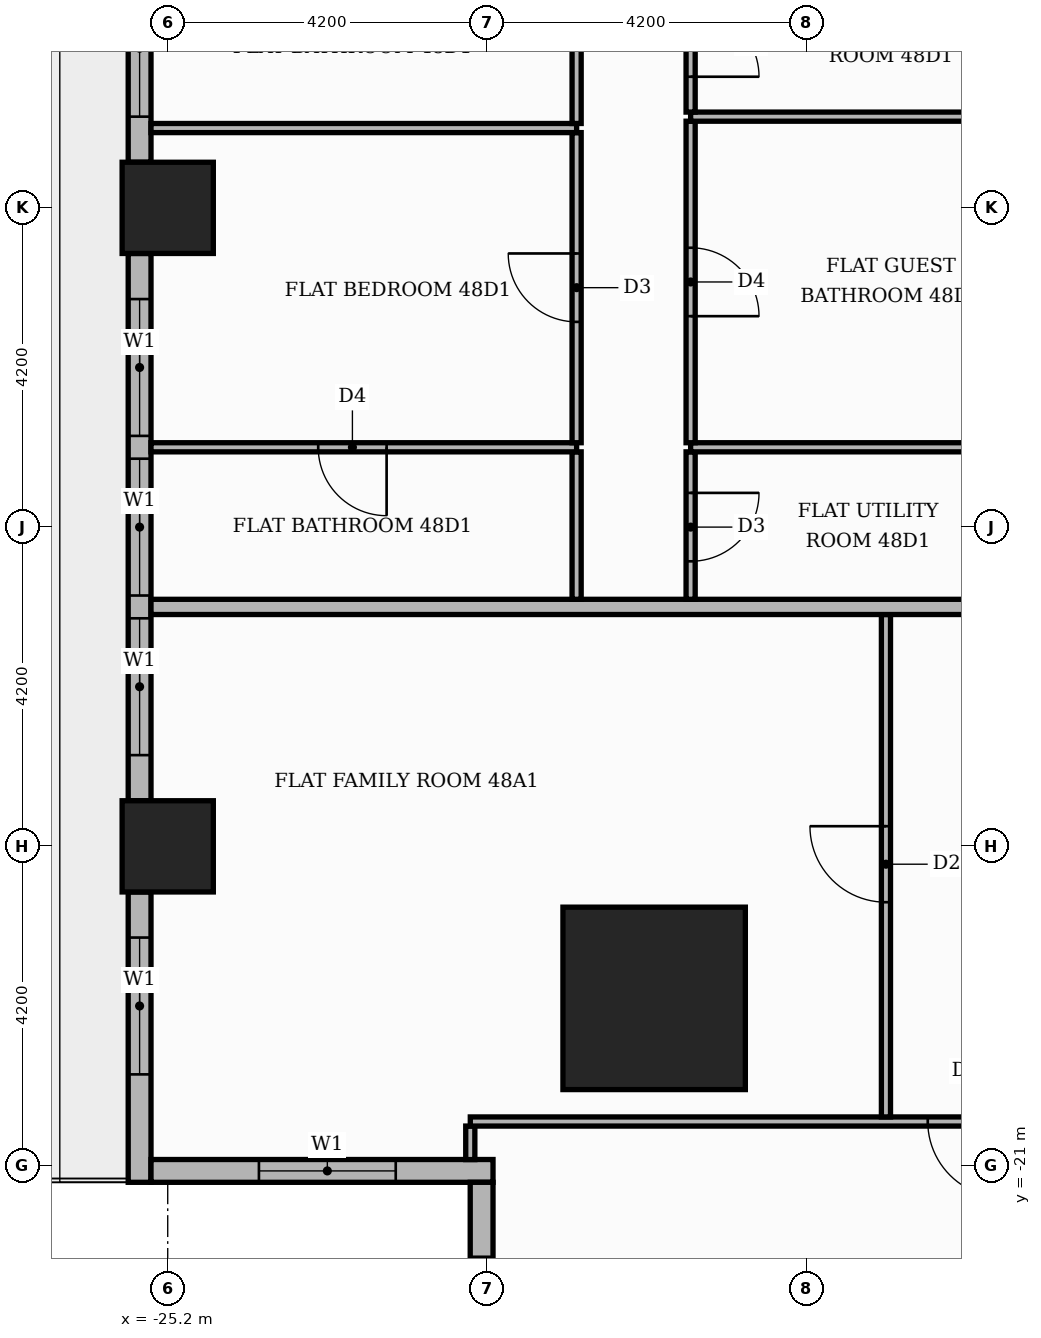
"""IFC4 building model, lengths in metres.
Left out: names, types, materials, properties, quantities, classifications, styles, units other than length and angle.
Written with IfcOpenShell. Run it as: python <this file> out.ifc"""

import sys

from ifc_helpers import new_model, si_unit, direction, frame, frame_2d, origin, origin_2d, place, context, subcontext, project, spatial, rectangle, extrude, element, fill, save


model = new_model("IFC4")
c1 = context("Model", 3, precision=1e-05, world=origin(), true_north=direction((0.0, 1.0)))
c2 = subcontext(c1, "Body", "Model", "MODEL_VIEW")
j1 = project(units=[si_unit("LENGTHUNIT", "METRE"), si_unit("PLANEANGLEUNIT", "RADIAN")], contexts=[c1])
p1 = place(None, origin())
s1 = spatial("IfcSite", under=j1, at=p1, CompositionType="ELEMENT")
p2 = place(p1, origin())
s2 = spatial("IfcBuilding", under=s1, at=p2, CompositionType="ELEMENT")
p3 = place(p2, frame((0.0, 0.0, 204.0)))
s3 = spatial("IfcBuildingStorey", under=s2, at=p3, CompositionType="ELEMENT", Elevation=204.0)
p4 = place(p3, frame((-18.8, -18.8, 0.0), z_axis=(0.0, 0.0, 1.0), x_axis=(1.0, 0.0, 0.0)))
e1 = element("IfcColumn", 1, at=p4, inside=s3, PredefinedType="COLUMN", context=c2, shape_type="SweptSolid", body=[
    extrude(rectangle(XDim=2.4, YDim=2.4, at=origin_2d()), origin(), (0.0, 0.0, 1.0), 3.9),
])
for number, where, z_axis, x_axis in (
    (2, (-25.2, -8.4, 0.0), (0.0, 0.0, 1.0), (1.0, 0.0, 0.0)),
    (3, (-25.2, -16.8, 0.0), (0.0, 0.0, 1.0), (1.0, 0.0, 0.0)),
):
    element("IfcColumn", number, at=place(p3, frame(where, z_axis=z_axis, x_axis=x_axis)), inside=s3, PredefinedType="COLUMN", context=c2, shape_type="SweptSolid", body=[
        extrude(rectangle(XDim=1.2, YDim=1.2, at=origin_2d()), origin(), (0.0, 0.0, 1.0), 3.9),
    ])
p5 = place(p3, frame((-25.57, -0.6, 0.0), z_axis=(0.0, 0.0, 1.0), x_axis=(0.0, -1.0, 0.0)))
e4 = element("IfcWall", 4, at=p5, inside=s3, PredefinedType="STANDARD", context=c2, shape_type="SweptSolid", body=[
    extrude(rectangle(XDim=7.2, YDim=0.3, at=frame_2d((3.6, 0.0))), origin(), (0.0, 0.0, 1.0), 3.48),
])
p6 = place(p5, frame((0.6, 0.0, 0.9)))
e5 = element("IfcOpeningElement", 5, at=p6, cuts=e4, PredefinedType="OPENING", context=c2, shape_type="SweptSolid", body=[
    extrude(rectangle(XDim=3.9, YDim=2.1, at=frame_2d((1.95, 1.05))), frame((0.0, 0.16, 0.0), z_axis=(0.0, -1.0, 0.0), x_axis=(1.0, 0.0, 0.0)), (0.0, 0.0, 1.0), 0.32),
])
p7 = place(p5, frame((4.8, 0.0, 0.9)))
e6 = element("IfcOpeningElement", 6, at=p7, cuts=e4, PredefinedType="OPENING", context=c2, shape_type="SweptSolid", body=[
    extrude(rectangle(XDim=1.8, YDim=2.1, at=frame_2d((0.9, 1.05))), frame((0.0, 0.16, 0.0), z_axis=(0.0, -1.0, 0.0), x_axis=(1.0, 0.0, 0.0)), (0.0, 0.0, 1.0), 0.32),
])
p8 = place(p3, frame((-25.57, -9.0, 0.0), z_axis=(0.0, 0.0, 1.0), x_axis=(0.0, -1.0, 0.0)))
e7 = element("IfcWall", 7, at=p8, inside=s3, PredefinedType="STANDARD", context=c2, shape_type="SweptSolid", body=[
    extrude(rectangle(XDim=7.2, YDim=0.3, at=frame_2d((3.6, 0.0))), origin(), (0.0, 0.0, 1.0), 3.48),
])
p9 = place(p8, frame((0.6, 0.0, 0.9)))
e8 = element("IfcOpeningElement", 8, at=p9, cuts=e7, PredefinedType="OPENING", context=c2, shape_type="SweptSolid", body=[
    extrude(rectangle(XDim=1.8, YDim=2.1, at=frame_2d((0.9, 1.05))), frame((0.0, 0.16, 0.0), z_axis=(0.0, -1.0, 0.0), x_axis=(1.0, 0.0, 0.0)), (0.0, 0.0, 1.0), 0.32),
])
p10 = place(p8, frame((2.7, 0.0, 0.9)))
e9 = element("IfcOpeningElement", 9, at=p10, cuts=e7, PredefinedType="OPENING", context=c2, shape_type="SweptSolid", body=[
    extrude(rectangle(XDim=1.8, YDim=2.1, at=frame_2d((0.9, 1.05))), frame((0.0, 0.16, 0.0), z_axis=(0.0, -1.0, 0.0), x_axis=(1.0, 0.0, 0.0)), (0.0, 0.0, 1.0), 0.32),
])
p11 = place(p8, frame((4.8, 0.0, 0.9)))
e10 = element("IfcOpeningElement", 10, at=p11, cuts=e7, PredefinedType="OPENING", context=c2, shape_type="SweptSolid", body=[
    extrude(rectangle(XDim=1.8, YDim=2.1, at=frame_2d((0.9, 1.05))), frame((0.0, 0.16, 0.0), z_axis=(0.0, -1.0, 0.0), x_axis=(1.0, 0.0, 0.0)), (0.0, 0.0, 1.0), 0.32),
])
p12 = place(p3, frame((-25.57, -17.4, 0.0), z_axis=(0.0, 0.0, 1.0), x_axis=(0.0, -1.0, 0.0)))
e11 = element("IfcWall", 11, at=p12, inside=s3, PredefinedType="STANDARD", context=c2, shape_type="SweptSolid", body=[
    extrude(rectangle(XDim=3.82, YDim=0.3, at=frame_2d((1.91, 0.0))), origin(), (0.0, 0.0, 1.0), 3.48),
])
p13 = place(p12, frame((0.6, 0.0, 0.9)))
e12 = element("IfcOpeningElement", 12, at=p13, cuts=e11, PredefinedType="OPENING", context=c2, shape_type="SweptSolid", body=[
    extrude(rectangle(XDim=1.8, YDim=2.1, at=frame_2d((0.9, 1.05))), frame((0.0, 0.16, 0.0), z_axis=(0.0, -1.0, 0.0), x_axis=(1.0, 0.0, 0.0)), (0.0, 0.0, 1.0), 0.32),
])
p14 = place(p3, frame((-25.42, -21.07, 0.0), z_axis=(0.0, 0.0, 1.0), x_axis=(1.0, 0.0, 0.0)))
e13 = element("IfcWall", 13, at=p14, inside=s3, PredefinedType="STANDARD", context=c2, shape_type="SweptSolid", body=[
    extrude(rectangle(XDim=4.5, YDim=0.3, at=frame_2d((2.25, 0.0))), origin(), (0.0, 0.0, 1.0), 3.48),
])
p15 = place(p14, frame((1.42, 0.0, 0.9)))
e14 = element("IfcOpeningElement", 14, at=p15, cuts=e13, PredefinedType="OPENING", context=c2, shape_type="SweptSolid", body=[
    extrude(rectangle(XDim=1.8, YDim=2.1, at=frame_2d((0.9, 1.05))), frame((0.0, 0.16, 0.0), z_axis=(0.0, -1.0, 0.0), x_axis=(1.0, 0.0, 0.0)), (0.0, 0.0, 1.0), 0.32),
])
p16 = place(p3, frame((-21.07, -21.22, 0.0), z_axis=(0.0, 0.0, 1.0), x_axis=(0.0, -1.0, 0.0)))
e15 = element("IfcWall", 15, at=p16, inside=s3, PredefinedType="STANDARD", context=c2, shape_type="SweptSolid", body=[
    extrude(rectangle(XDim=4.5, YDim=0.3, at=frame_2d((2.25, 0.0))), origin(), (0.0, 0.0, 1.0), 3.48),
])
p17 = place(p16, frame((0.98, 0.0, 0.9)))
e16 = element("IfcOpeningElement", 16, at=p17, cuts=e15, PredefinedType="OPENING", context=c2, shape_type="SweptSolid", body=[
    extrude(rectangle(XDim=1.8, YDim=2.1, at=frame_2d((0.9, 1.05))), frame((0.0, 0.16, 0.0), z_axis=(0.0, -1.0, 0.0), x_axis=(1.0, 0.0, 0.0)), (0.0, 0.0, 1.0), 0.32),
])
p18 = place(p3, frame((-21.219, -20.921, 0.0), z_axis=(0.0, 0.0, 1.0), x_axis=(0.0, 1.0, 0.0)))
e17 = element("IfcWall", 17, at=p18, inside=s3, PredefinedType="PARTITIONING", context=c2, shape_type="SweptSolid", body=[
    extrude(rectangle(XDim=0.441, YDim=0.12, at=frame_2d((0.22, 0.0))), origin(), (0.0, 0.0, 1.0), 3.48),
])
p19 = place(p3, frame((-21.219, -20.42, 0.0), z_axis=(0.0, 0.0, 1.0), x_axis=(1.0, 0.0, 0.0)))
e18 = element("IfcWall", 18, at=p19, inside=s3, PredefinedType="PARTITIONING", context=c2, shape_type="SweptSolid", body=[
    extrude(rectangle(XDim=15.869, YDim=0.12, at=frame_2d((7.935, 0.0))), origin(), (0.0, 0.0, 1.0), 3.48),
])
p20 = place(p19, frame((6.019, 0.0, 0.0)))
e19 = element("IfcOpeningElement", 19, at=p20, cuts=e18, PredefinedType="OPENING", context=c2, shape_type="SweptSolid", body=[
    extrude(rectangle(XDim=1.0, YDim=2.1, at=frame_2d((0.5, 1.05))), frame((0.0, 0.07, 0.0), z_axis=(0.0, -1.0, 0.0), x_axis=(1.0, 0.0, 0.0)), (0.0, 0.0, 1.0), 0.14),
])
p21 = place(p19, frame((9.219, 0.0, 0.0)))
e20 = element("IfcOpeningElement", 20, at=p21, cuts=e18, PredefinedType="OPENING", context=c2, shape_type="SweptSolid", body=[
    extrude(rectangle(XDim=0.9, YDim=2.1, at=frame_2d((0.45, 1.05))), frame((0.0, 0.07, 0.0), z_axis=(0.0, -1.0, 0.0), x_axis=(1.0, 0.0, 0.0)), (0.0, 0.0, 1.0), 0.14),
])
p22 = place(p3, frame((-15.75, -20.36, 0.0), z_axis=(0.0, 0.0, 1.0), x_axis=(0.0, 1.0, 0.0)))
e21 = element("IfcWall", 21, at=p22, inside=s3, PredefinedType="PARTITIONING", context=c2, shape_type="SweptSolid", body=[
    extrude(rectangle(XDim=6.61, YDim=0.12, at=frame_2d((3.305, 0.0))), origin(), (0.0, 0.0, 1.0), 3.48),
])
p23 = place(p22, frame((2.825, 0.0, 0.0)))
e22 = element("IfcOpeningElement", 22, at=p23, cuts=e21, PredefinedType="OPENING", context=c2, shape_type="SweptSolid", body=[
    extrude(rectangle(XDim=1.0, YDim=2.1, at=frame_2d((0.5, 1.05))), frame((0.0, 0.07, 0.0), z_axis=(0.0, -1.0, 0.0), x_axis=(1.0, 0.0, 0.0)), (0.0, 0.0, 1.0), 0.14),
])
p24 = place(p3, frame((-25.42, -13.65, 0.0), z_axis=(0.0, 0.0, 1.0), x_axis=(1.0, 0.0, 0.0)))
e23 = element("IfcWall", 23, at=p24, inside=s3, PredefinedType="PARTITIONING", context=c2, shape_type="SweptSolid", body=[
    extrude(rectangle(XDim=39.07, YDim=0.2, at=frame_2d((19.535, 0.0))), origin(), (0.0, 0.0, 1.0), 3.48),
])
p25 = place(p24, frame((13.32, 0.0, 0.0)))
e24 = element("IfcOpeningElement", 24, at=p25, cuts=e23, PredefinedType="OPENING", context=c2, shape_type="SweptSolid", body=[
    extrude(rectangle(XDim=1.1, YDim=2.4, at=frame_2d((0.55, 1.2))), frame((0.0, 0.11, 0.0), z_axis=(0.0, -1.0, 0.0), x_axis=(1.0, 0.0, 0.0)), (0.0, 0.0, 1.0), 0.22),
])
p26 = place(p24, frame((25.92, 0.0, 0.0)))
e25 = element("IfcOpeningElement", 25, at=p26, cuts=e23, PredefinedType="OPENING", context=c2, shape_type="SweptSolid", body=[
    extrude(rectangle(XDim=1.1, YDim=2.4, at=frame_2d((0.55, 1.2))), frame((0.0, 0.11, 0.0), z_axis=(0.0, -1.0, 0.0), x_axis=(1.0, 0.0, 0.0)), (0.0, 0.0, 1.0), 0.22),
])
p27 = place(p3, frame((-19.82, -13.55, 0.0), z_axis=(0.0, 0.0, 1.0), x_axis=(0.0, 1.0, 0.0)))
e26 = element("IfcWall", 26, at=p27, inside=s3, PredefinedType="PARTITIONING", context=c2, shape_type="SweptSolid", body=[
    extrude(rectangle(XDim=1.94, YDim=0.12, at=frame_2d((0.97, 0.0))), origin(), (0.0, 0.0, 1.0), 3.48),
])
p28 = place(p3, frame((-18.32, -13.55, 0.0), z_axis=(0.0, 0.0, 1.0), x_axis=(0.0, 1.0, 0.0)))
e27 = element("IfcWall", 27, at=p28, inside=s3, PredefinedType="PARTITIONING", context=c2, shape_type="SweptSolid", body=[
    extrude(rectangle(XDim=1.94, YDim=0.12, at=frame_2d((0.97, 0.0))), origin(), (0.0, 0.0, 1.0), 3.48),
])
p29 = place(p28, frame((0.5, 0.0, 0.0)))
e28 = element("IfcOpeningElement", 28, at=p29, cuts=e27, PredefinedType="OPENING", context=c2, shape_type="SweptSolid", body=[
    extrude(rectangle(XDim=0.9, YDim=2.1, at=frame_2d((0.45, 1.05))), frame((0.0, 0.07, 0.0), z_axis=(0.0, -1.0, 0.0), x_axis=(1.0, 0.0, 0.0)), (0.0, 0.0, 1.0), 0.14),
])
p30 = place(p3, frame((-25.42, -11.55, 0.0), z_axis=(0.0, 0.0, 1.0), x_axis=(1.0, 0.0, 0.0)))
e29 = element("IfcWall", 29, at=p30, inside=s3, PredefinedType="PARTITIONING", context=c2, shape_type="SweptSolid", body=[
    extrude(rectangle(XDim=5.6, YDim=0.12, at=frame_2d((2.8, 0.0))), origin(), (0.0, 0.0, 1.0), 3.48),
])
p31 = place(p30, frame((2.2, 0.0, 0.0)))
e30 = element("IfcOpeningElement", 30, at=p31, cuts=e29, PredefinedType="OPENING", context=c2, shape_type="SweptSolid", body=[
    extrude(rectangle(XDim=0.9, YDim=2.1, at=frame_2d((0.45, 1.05))), frame((0.0, 0.07, 0.0), z_axis=(0.0, -1.0, 0.0), x_axis=(1.0, 0.0, 0.0)), (0.0, 0.0, 1.0), 0.14),
])
p32 = place(p3, frame((-18.32, -11.55, 0.0), z_axis=(0.0, 0.0, 1.0), x_axis=(1.0, 0.0, 0.0)))
e31 = element("IfcWall", 31, at=p32, inside=s3, PredefinedType="PARTITIONING", context=c2, shape_type="SweptSolid", body=[
    extrude(rectangle(XDim=4.57, YDim=0.12, at=frame_2d((2.285, 0.0))), origin(), (0.0, 0.0, 1.0), 3.48),
])
p33 = place(p3, frame((-19.82, -11.49, 0.0), z_axis=(0.0, 0.0, 1.0), x_axis=(0.0, 1.0, 0.0)))
e32 = element("IfcWall", 32, at=p33, inside=s3, PredefinedType="PARTITIONING", context=c2, shape_type="SweptSolid", body=[
    extrude(rectangle(XDim=4.08, YDim=0.12, at=frame_2d((2.04, 0.0))), origin(), (0.0, 0.0, 1.0), 3.48),
])
p34 = place(p33, frame((1.59, 0.0, 0.0)))
e33 = element("IfcOpeningElement", 33, at=p34, cuts=e32, PredefinedType="OPENING", context=c2, shape_type="SweptSolid", body=[
    extrude(rectangle(XDim=0.9, YDim=2.1, at=frame_2d((0.45, 1.05))), frame((0.0, 0.07, 0.0), z_axis=(0.0, -1.0, 0.0), x_axis=(1.0, 0.0, 0.0)), (0.0, 0.0, 1.0), 0.14),
])
p35 = place(p3, frame((-18.32, -11.49, 0.0), z_axis=(0.0, 0.0, 1.0), x_axis=(0.0, 1.0, 0.0)))
e34 = element("IfcWall", 34, at=p35, inside=s3, PredefinedType="PARTITIONING", context=c2, shape_type="SweptSolid", body=[
    extrude(rectangle(XDim=4.23, YDim=0.12, at=frame_2d((2.115, 0.0))), origin(), (0.0, 0.0, 1.0), 3.48),
])
p36 = place(p35, frame((1.665, 0.0, 0.0)))
e35 = element("IfcOpeningElement", 35, at=p36, cuts=e34, PredefinedType="OPENING", context=c2, shape_type="SweptSolid", body=[
    extrude(rectangle(XDim=0.9, YDim=2.1, at=frame_2d((0.45, 1.05))), frame((0.0, 0.07, 0.0), z_axis=(0.0, -1.0, 0.0), x_axis=(1.0, 0.0, 0.0)), (0.0, 0.0, 1.0), 0.14),
])
p37 = place(p3, frame((-25.42, -7.35, 0.0), z_axis=(0.0, 0.0, 1.0), x_axis=(1.0, 0.0, 0.0)))
e36 = element("IfcWall", 36, at=p37, inside=s3, PredefinedType="PARTITIONING", context=c2, shape_type="SweptSolid", body=[
    extrude(rectangle(XDim=5.6, YDim=0.12, at=frame_2d((2.8, 0.0))), origin(), (0.0, 0.0, 1.0), 3.48),
])
p38 = place(p3, frame((-19.82, -7.29, 0.0), z_axis=(0.0, 0.0, 1.0), x_axis=(0.0, 1.0, 0.0)))
e37 = element("IfcWall", 37, at=p38, inside=s3, PredefinedType="PARTITIONING", context=c2, shape_type="SweptSolid", body=[
    extrude(rectangle(XDim=1.98, YDim=0.12, at=frame_2d((0.99, 0.0))), origin(), (0.0, 0.0, 1.0), 3.48),
])
p39 = place(p3, frame((-18.32, -7.2, 0.0), z_axis=(0.0, 0.0, 1.0), x_axis=(1.0, 0.0, 0.0)))
e38 = element("IfcWall", 38, at=p39, inside=s3, PredefinedType="PARTITIONING", context=c2, shape_type="SweptSolid", body=[
    extrude(rectangle(XDim=4.57, YDim=0.12, at=frame_2d((2.285, 0.0))), origin(), (0.0, 0.0, 1.0), 3.48),
])
p40 = place(p3, frame((-18.32, -7.14, 0.0), z_axis=(0.0, 0.0, 1.0), x_axis=(0.0, 1.0, 0.0)))
e39 = element("IfcWall", 39, at=p40, inside=s3, PredefinedType="PARTITIONING", context=c2, shape_type="SweptSolid", body=[
    extrude(rectangle(XDim=1.83, YDim=0.12, at=frame_2d((0.915, 0.0))), origin(), (0.0, 0.0, 1.0), 3.48),
])
p41 = place(p40, frame((0.465, 0.0, 0.0)))
e40 = element("IfcOpeningElement", 40, at=p41, cuts=e39, PredefinedType="OPENING", context=c2, shape_type="SweptSolid", body=[
    extrude(rectangle(XDim=0.9, YDim=2.1, at=frame_2d((0.45, 1.05))), frame((0.0, 0.07, 0.0), z_axis=(0.0, -1.0, 0.0), x_axis=(1.0, 0.0, 0.0)), (0.0, 0.0, 1.0), 0.14),
])
p42 = place(p7, origin())
e41 = element("IfcWindow", 41, at=p42, inside=s3, PartitioningType="SINGLE_PANEL", PredefinedType="WINDOW", context=c2, shape_type="SweptSolid", body=[
    extrude(rectangle(XDim=1.8, YDim=2.1, at=frame_2d((0.9, 1.05))), frame((0.0, 0.03, 0.0), z_axis=(0.0, -1.0, 0.0), x_axis=(1.0, 0.0, 0.0)), (0.0, 0.0, 1.0), 0.06),
])
fill(e6, e41)
p43 = place(p9, origin())
e42 = element("IfcWindow", 42, at=p43, inside=s3, PartitioningType="SINGLE_PANEL", PredefinedType="WINDOW", context=c2, shape_type="SweptSolid", body=[
    extrude(rectangle(XDim=1.8, YDim=2.1, at=frame_2d((0.9, 1.05))), frame((0.0, 0.03, 0.0), z_axis=(0.0, -1.0, 0.0), x_axis=(1.0, 0.0, 0.0)), (0.0, 0.0, 1.0), 0.06),
])
fill(e8, e42)
p44 = place(p10, origin())
e43 = element("IfcWindow", 43, at=p44, inside=s3, PartitioningType="SINGLE_PANEL", PredefinedType="WINDOW", context=c2, shape_type="SweptSolid", body=[
    extrude(rectangle(XDim=1.8, YDim=2.1, at=frame_2d((0.9, 1.05))), frame((0.0, 0.03, 0.0), z_axis=(0.0, -1.0, 0.0), x_axis=(1.0, 0.0, 0.0)), (0.0, 0.0, 1.0), 0.06),
])
fill(e9, e43)
p45 = place(p11, origin())
e44 = element("IfcWindow", 44, at=p45, inside=s3, PartitioningType="SINGLE_PANEL", PredefinedType="WINDOW", context=c2, shape_type="SweptSolid", body=[
    extrude(rectangle(XDim=1.8, YDim=2.1, at=frame_2d((0.9, 1.05))), frame((0.0, 0.03, 0.0), z_axis=(0.0, -1.0, 0.0), x_axis=(1.0, 0.0, 0.0)), (0.0, 0.0, 1.0), 0.06),
])
fill(e10, e44)
p46 = place(p13, origin())
e45 = element("IfcWindow", 45, at=p46, inside=s3, PartitioningType="SINGLE_PANEL", PredefinedType="WINDOW", context=c2, shape_type="SweptSolid", body=[
    extrude(rectangle(XDim=1.8, YDim=2.1, at=frame_2d((0.9, 1.05))), frame((0.0, 0.03, 0.0), z_axis=(0.0, -1.0, 0.0), x_axis=(1.0, 0.0, 0.0)), (0.0, 0.0, 1.0), 0.06),
])
fill(e12, e45)
p47 = place(p15, origin())
e46 = element("IfcWindow", 46, at=p47, inside=s3, PartitioningType="SINGLE_PANEL", PredefinedType="WINDOW", context=c2, shape_type="SweptSolid", body=[
    extrude(rectangle(XDim=1.8, YDim=2.1, at=frame_2d((0.9, 1.05))), frame((0.0, 0.03, 0.0), z_axis=(0.0, -1.0, 0.0), x_axis=(1.0, 0.0, 0.0)), (0.0, 0.0, 1.0), 0.06),
])
fill(e14, e46)
p48 = place(p17, origin())
e47 = element("IfcWindow", 47, at=p48, inside=s3, PartitioningType="SINGLE_PANEL", PredefinedType="WINDOW", context=c2, shape_type="SweptSolid", body=[
    extrude(rectangle(XDim=1.8, YDim=2.1, at=frame_2d((0.9, 1.05))), frame((0.0, 0.03, 0.0), z_axis=(0.0, -1.0, 0.0), x_axis=(1.0, 0.0, 0.0)), (0.0, 0.0, 1.0), 0.06),
])
fill(e16, e47)
p49 = place(p23, origin())
e48 = element("IfcDoor", 48, at=p49, inside=s3, OperationType="SINGLE_SWING_RIGHT", PredefinedType="DOOR", context=c2, shape_type="SweptSolid", body=[
    extrude(rectangle(XDim=1.0, YDim=2.1, at=frame_2d((0.5, 1.05))), frame((0.0, 0.025, 0.0), z_axis=(0.0, -1.0, 0.0), x_axis=(1.0, 0.0, 0.0)), (0.0, 0.0, 1.0), 0.05),
])
fill(e22, e48)
p50 = place(p20, frame((1.0, 0.0, 0.0), z_axis=(0.0, 0.0, 1.0), x_axis=(-1.0, 0.0, 0.0)))
e49 = element("IfcDoor", 49, at=p50, inside=s3, OperationType="SINGLE_SWING_RIGHT", PredefinedType="DOOR", context=c2, shape_type="SweptSolid", body=[
    extrude(rectangle(XDim=1.0, YDim=2.1, at=frame_2d((0.5, 1.05))), frame((0.0, 0.025, 0.0), z_axis=(0.0, -1.0, 0.0), x_axis=(1.0, 0.0, 0.0)), (0.0, 0.0, 1.0), 0.05),
])
fill(e19, e49)
p51 = place(p41, frame((0.9, 0.0, 0.0), z_axis=(0.0, 0.0, 1.0), x_axis=(-1.0, 0.0, 0.0)))
e50 = element("IfcDoor", 50, at=p51, inside=s3, OperationType="SINGLE_SWING_LEFT", PredefinedType="DOOR", context=c2, shape_type="SweptSolid", body=[
    extrude(rectangle(XDim=0.9, YDim=2.1, at=frame_2d((0.45, 1.05))), frame((0.0, 0.025, 0.0), z_axis=(0.0, -1.0, 0.0), x_axis=(1.0, 0.0, 0.0)), (0.0, 0.0, 1.0), 0.05),
])
fill(e40, e50)
p52 = place(p36, frame((0.9, 0.0, 0.0), z_axis=(0.0, 0.0, 1.0), x_axis=(-1.0, 0.0, 0.0)))
e51 = element("IfcDoor", 51, at=p52, inside=s3, OperationType="SINGLE_SWING_LEFT", PredefinedType="DOOR", context=c2, shape_type="SweptSolid", body=[
    extrude(rectangle(XDim=0.9, YDim=2.1, at=frame_2d((0.45, 1.05))), frame((0.0, 0.025, 0.0), z_axis=(0.0, -1.0, 0.0), x_axis=(1.0, 0.0, 0.0)), (0.0, 0.0, 1.0), 0.05),
])
fill(e35, e51)
p53 = place(p29, frame((0.9, 0.0, 0.0), z_axis=(0.0, 0.0, 1.0), x_axis=(-1.0, 0.0, 0.0)))
e52 = element("IfcDoor", 52, at=p53, inside=s3, OperationType="SINGLE_SWING_RIGHT", PredefinedType="DOOR", context=c2, shape_type="SweptSolid", body=[
    extrude(rectangle(XDim=0.9, YDim=2.1, at=frame_2d((0.45, 1.05))), frame((0.0, 0.025, 0.0), z_axis=(0.0, -1.0, 0.0), x_axis=(1.0, 0.0, 0.0)), (0.0, 0.0, 1.0), 0.05),
])
fill(e28, e52)
p54 = place(p34, origin())
e53 = element("IfcDoor", 53, at=p54, inside=s3, OperationType="SINGLE_SWING_RIGHT", PredefinedType="DOOR", context=c2, shape_type="SweptSolid", body=[
    extrude(rectangle(XDim=0.9, YDim=2.1, at=frame_2d((0.45, 1.05))), frame((0.0, 0.025, 0.0), z_axis=(0.0, -1.0, 0.0), x_axis=(1.0, 0.0, 0.0)), (0.0, 0.0, 1.0), 0.05),
])
fill(e33, e53)
p55 = place(p31, frame((0.9, 0.0, 0.0), z_axis=(0.0, 0.0, 1.0), x_axis=(-1.0, 0.0, 0.0)))
e54 = element("IfcDoor", 54, at=p55, inside=s3, OperationType="SINGLE_SWING_RIGHT", PredefinedType="DOOR", context=c2, shape_type="SweptSolid", body=[
    extrude(rectangle(XDim=0.9, YDim=2.1, at=frame_2d((0.45, 1.05))), frame((0.0, 0.025, 0.0), z_axis=(0.0, -1.0, 0.0), x_axis=(1.0, 0.0, 0.0)), (0.0, 0.0, 1.0), 0.05),
])
fill(e30, e54)
save(model, sys.argv[1])
